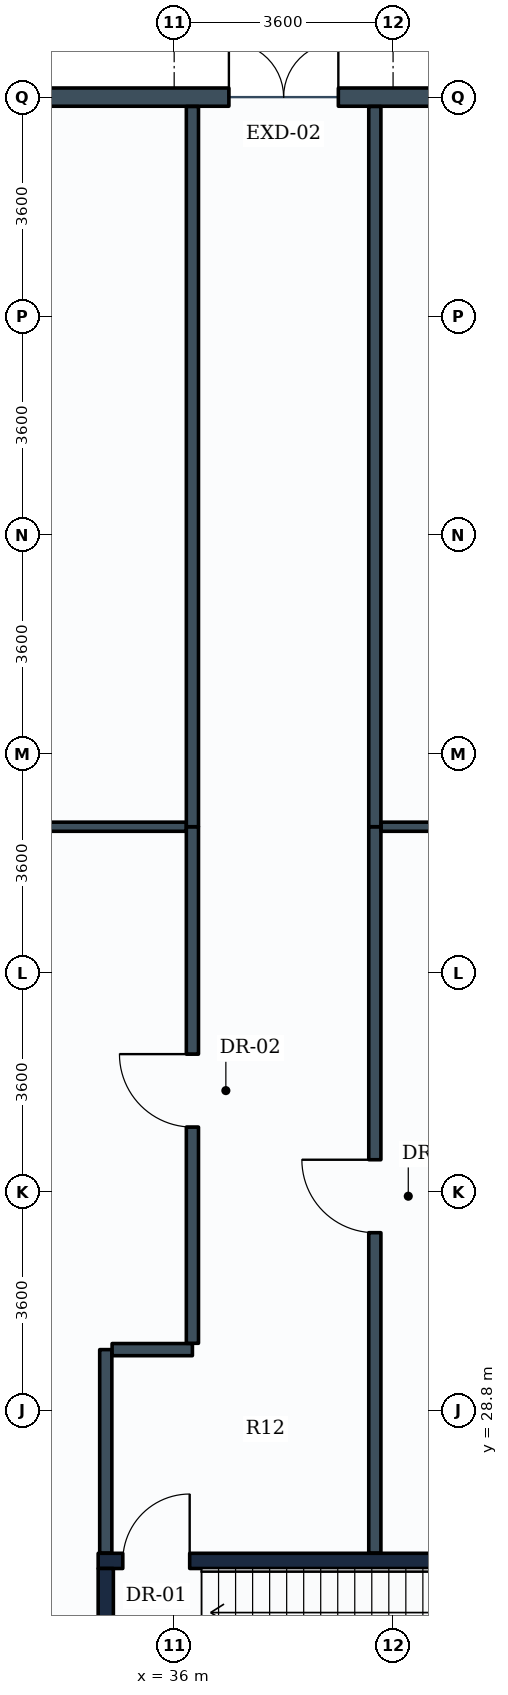
"""IFC4 building model, lengths in metres.
Left out: names, types, materials, properties, quantities, classifications, styles, units other than length and angle.
Written with IfcOpenShell. Run it as: python <this file> out.ifc"""

import sys

from ifc_helpers import new_model, si_unit, direction, frame, frame_2d, origin, place, context, subcontext, project, spatial, rectangle, extrude, element, fill, save


model = new_model("IFC4")
c1 = context("Model", 3, precision=1e-05, world=origin(), true_north=direction((0.0, 1.0)))
c2 = subcontext(c1, "Body", "Model", "MODEL_VIEW")
j1 = project(units=[si_unit("LENGTHUNIT", "METRE"), si_unit("PLANEANGLEUNIT", "RADIAN")], contexts=[c1])
p1 = place(None, origin())
s1 = spatial("IfcSite", under=j1, at=p1, CompositionType="ELEMENT")
p2 = place(p1, origin())
s2 = spatial("IfcBuilding", under=s1, at=p2, CompositionType="ELEMENT")
p3 = place(p2, origin())
s3 = spatial("IfcBuildingStorey", under=s2, at=p3, CompositionType="ELEMENT", Elevation=0.0)
p4 = place(p3, frame((0.0, 50.4, 0.0), z_axis=(0.0, 0.0, 1.0), x_axis=(1.0, 0.0, 0.0)))
e1 = element("IfcWall", 1, at=p4, inside=s3, PredefinedType="STANDARD", context=c2, shape_type="SweptSolid", body=[
    extrude(rectangle(XDim=72.0, YDim=0.3, at=frame_2d((36.0, 0.0))), origin(), (0.0, 0.0, 1.0), 4.43),
])
p5 = place(p4, frame((25.2, 0.0, 0.0)))
e2 = element("IfcOpeningElement", 2, at=p5, cuts=e1, PredefinedType="OPENING", context=c2, shape_type="SweptSolid", body=[
    extrude(rectangle(XDim=1.8, YDim=2.2, at=frame_2d((0.9, 1.1))), frame((0.0, 0.16, 0.0), z_axis=(0.0, -1.0, 0.0), x_axis=(1.0, 0.0, 0.0)), (0.0, 0.0, 1.0), 0.32),
])
p6 = place(p4, frame((36.9, 0.0, 0.0)))
e3 = element("IfcOpeningElement", 3, at=p6, cuts=e1, PredefinedType="OPENING", context=c2, shape_type="SweptSolid", body=[
    extrude(rectangle(XDim=1.8, YDim=2.2, at=frame_2d((0.9, 1.1))), frame((0.0, 0.16, 0.0), z_axis=(0.0, -1.0, 0.0), x_axis=(1.0, 0.0, 0.0)), (0.0, 0.0, 1.0), 0.32),
])
p7 = place(p4, frame((58.5, 0.0, 0.0)))
e4 = element("IfcOpeningElement", 4, at=p7, cuts=e1, PredefinedType="OPENING", context=c2, shape_type="SweptSolid", body=[
    extrude(rectangle(XDim=1.8, YDim=2.2, at=frame_2d((0.9, 1.1))), frame((0.0, 0.16, 0.0), z_axis=(0.0, -1.0, 0.0), x_axis=(1.0, 0.0, 0.0)), (0.0, 0.0, 1.0), 0.32),
])
p8 = place(p4, frame((65.8, 0.0, 0.0)))
e5 = element("IfcOpeningElement", 5, at=p8, cuts=e1, PredefinedType="OPENING", context=c2, shape_type="SweptSolid", body=[
    extrude(rectangle(XDim=5.0, YDim=3.4, at=frame_2d((2.5, 1.7))), frame((0.0, 0.16, 0.0), z_axis=(0.0, -1.0, 0.0), x_axis=(1.0, 0.0, 0.0)), (0.0, 0.0, 1.0), 0.32),
])
p9 = place(p3, frame((34.75, 26.325, 0.0), z_axis=(0.0, 0.0, 1.0), x_axis=(1.0, 0.0, 0.0)))
e6 = element("IfcWall", 6, at=p9, inside=s3, PredefinedType="SHEAR", context=c2, shape_type="SweptSolid", body=[
    extrude(rectangle(XDim=7.8, YDim=0.25, at=frame_2d((3.9, 0.0))), origin(), (0.0, 0.0, 1.0), 5.1),
])
p10 = place(p9, frame((0.405, 0.0, 0.0)))
e7 = element("IfcOpeningElement", 7, at=p10, cuts=e6, PredefinedType="OPENING", context=c2, shape_type="SweptSolid", body=[
    extrude(rectangle(XDim=1.1, YDim=2.1, at=frame_2d((0.55, 1.05))), frame((0.0, 0.135, 0.0), z_axis=(0.0, -1.0, 0.0), x_axis=(1.0, 0.0, 0.0)), (0.0, 0.0, 1.0), 0.27),
])
p11 = place(p3, frame((34.875, 23.1, 0.0), z_axis=(0.0, 0.0, 1.0), x_axis=(0.0, 1.0, 0.0)))
e8 = element("IfcWall", 8, at=p11, inside=s3, PredefinedType="SHEAR", context=c2, shape_type="SweptSolid", body=[
    extrude(rectangle(XDim=3.1, YDim=0.25, at=frame_2d((1.55, 0.0))), origin(), (0.0, 0.0, 1.0), 5.1),
])
p12 = place(p3, frame((34.875, 26.454, 0.0), z_axis=(0.0, 0.0, 1.0), x_axis=(0.0, 1.0, 0.0)))
e9 = element("IfcWall", 9, at=p12, inside=s3, PredefinedType="PARTITIONING", context=c2, shape_type="SweptSolid", body=[
    extrude(rectangle(XDim=3.346, YDim=0.2, at=frame_2d((1.673, 0.0))), origin(), (0.0, 0.0, 1.0), 5.085),
])
p13 = place(p3, frame((34.979, 29.8, 0.0), z_axis=(0.0, 0.0, 1.0), x_axis=(1.0, 0.0, 0.0)))
e10 = element("IfcWall", 10, at=p13, inside=s3, PredefinedType="PARTITIONING", context=c2, shape_type="SweptSolid", body=[
    extrude(rectangle(XDim=1.321, YDim=0.2, at=frame_2d((0.661, 0.0))), origin(), (0.0, 0.0, 1.0), 5.085),
])
p14 = place(p3, frame((36.3, 29.904, 0.0), z_axis=(0.0, 0.0, 1.0), x_axis=(0.0, 1.0, 0.0)))
e11 = element("IfcWall", 11, at=p14, inside=s3, PredefinedType="PARTITIONING", context=c2, shape_type="SweptSolid", body=[
    extrude(rectangle(XDim=8.496, YDim=0.2, at=frame_2d((4.248, 0.0))), origin(), (0.0, 0.0, 1.0), 4.43),
])
p15 = place(p14, frame((3.556, 0.0, 0.0)))
e12 = element("IfcOpeningElement", 12, at=p15, cuts=e11, PredefinedType="OPENING", context=c2, shape_type="SweptSolid", body=[
    extrude(rectangle(XDim=1.2, YDim=2.1, at=frame_2d((0.6, 1.05))), frame((0.0, 0.11, 0.0), z_axis=(0.0, -1.0, 0.0), x_axis=(1.0, 0.0, 0.0)), (0.0, 0.0, 1.0), 0.22),
])
p16 = place(p3, frame((36.3, 38.4, 0.0), z_axis=(0.0, 0.0, 1.0), x_axis=(0.0, 1.0, 0.0)))
e13 = element("IfcWall", 13, at=p16, inside=s3, PredefinedType="PARTITIONING", context=c2, shape_type="SweptSolid", body=[
    extrude(rectangle(XDim=11.846, YDim=0.2, at=frame_2d((5.923, 0.0))), origin(), (0.0, 0.0, 1.0), 4.43),
])
p17 = place(p3, frame((39.3, 26.454, 0.0), z_axis=(0.0, 0.0, 1.0), x_axis=(0.0, 1.0, 0.0)))
e14 = element("IfcWall", 14, at=p17, inside=s3, PredefinedType="PARTITIONING", context=c2, shape_type="SweptSolid", body=[
    extrude(rectangle(XDim=11.946, YDim=0.2, at=frame_2d((5.973, 0.0))), origin(), (0.0, 0.0, 1.0), 4.43),
])
p18 = place(p17, frame((5.269, 0.0, 0.0)))
e15 = element("IfcOpeningElement", 15, at=p18, cuts=e14, PredefinedType="OPENING", context=c2, shape_type="SweptSolid", body=[
    extrude(rectangle(XDim=1.2, YDim=2.1, at=frame_2d((0.6, 1.05))), frame((0.0, 0.11, 0.0), z_axis=(0.0, -1.0, 0.0), x_axis=(1.0, 0.0, 0.0)), (0.0, 0.0, 1.0), 0.22),
])
p19 = place(p3, frame((39.3, 38.4, 0.0), z_axis=(0.0, 0.0, 1.0), x_axis=(0.0, 1.0, 0.0)))
e16 = element("IfcWall", 16, at=p19, inside=s3, PredefinedType="PARTITIONING", context=c2, shape_type="SweptSolid", body=[
    extrude(rectangle(XDim=11.846, YDim=0.2, at=frame_2d((5.923, 0.0))), origin(), (0.0, 0.0, 1.0), 4.43),
])
p20 = place(p3, frame((18.0, 38.4, 0.0), z_axis=(0.0, 0.0, 1.0), x_axis=(1.0, 0.0, 0.0)))
e17 = element("IfcWall", 17, at=p20, inside=s3, PredefinedType="PARTITIONING", context=c2, shape_type="SweptSolid", body=[
    extrude(rectangle(XDim=18.196, YDim=0.15, at=frame_2d((9.098, 0.0))), origin(), (0.0, 0.0, 1.0), 4.43),
])
p21 = place(p20, frame((8.35, 0.0, 0.0)))
e18 = element("IfcOpeningElement", 18, at=p21, cuts=e17, PredefinedType="OPENING", context=c2, shape_type="SweptSolid", body=[
    extrude(rectangle(XDim=1.6, YDim=2.2, at=frame_2d((0.8, 1.1))), frame((0.0, 0.085, 0.0), z_axis=(0.0, -1.0, 0.0), x_axis=(1.0, 0.0, 0.0)), (0.0, 0.0, 1.0), 0.17),
])
p22 = place(p3, frame((39.404, 38.4, 0.0), z_axis=(0.0, 0.0, 1.0), x_axis=(1.0, 0.0, 0.0)))
e19 = element("IfcWall", 19, at=p22, inside=s3, PredefinedType="PARTITIONING", context=c2, shape_type="SweptSolid", body=[
    extrude(rectangle(XDim=8.596, YDim=0.15, at=frame_2d((4.298, 0.0))), origin(), (0.0, 0.0, 1.0), 4.43),
])
p23 = place(p22, frame((3.446, 0.0, 0.0)))
e20 = element("IfcOpeningElement", 20, at=p23, cuts=e19, PredefinedType="OPENING", context=c2, shape_type="SweptSolid", body=[
    extrude(rectangle(XDim=1.6, YDim=2.2, at=frame_2d((0.8, 1.1))), frame((0.0, 0.085, 0.0), z_axis=(0.0, -1.0, 0.0), x_axis=(1.0, 0.0, 0.0)), (0.0, 0.0, 1.0), 0.17),
])
p24 = place(p6, origin())
e21 = element("IfcDoor", 21, at=p24, inside=s3, OperationType="SINGLE_SWING_LEFT", PredefinedType="DOOR", context=c2, shape_type="SweptSolid", body=[
    extrude(rectangle(XDim=1.8, YDim=2.2, at=frame_2d((0.9, 1.1))), frame((0.0, 0.025, 0.0), z_axis=(0.0, -1.0, 0.0), x_axis=(1.0, 0.0, 0.0)), (0.0, 0.0, 1.0), 0.05),
])
fill(e3, e21)
p25 = place(p10, origin())
e22 = element("IfcDoor", 22, at=p25, inside=s3, OperationType="SINGLE_SWING_RIGHT", PredefinedType="DOOR", context=c2, shape_type="SweptSolid", body=[
    extrude(rectangle(XDim=1.1, YDim=2.1, at=frame_2d((0.55, 1.05))), frame((0.0, 0.025, 0.0), z_axis=(0.0, -1.0, 0.0), x_axis=(1.0, 0.0, 0.0)), (0.0, 0.0, 1.0), 0.05),
])
fill(e7, e22)
p26 = place(p15, origin())
e23 = element("IfcDoor", 23, at=p26, inside=s3, OperationType="SINGLE_SWING_RIGHT", PredefinedType="DOOR", context=c2, shape_type="SweptSolid", body=[
    extrude(rectangle(XDim=1.2, YDim=2.1, at=frame_2d((0.6, 1.05))), frame((0.0, 0.025, 0.0), z_axis=(0.0, -1.0, 0.0), x_axis=(1.0, 0.0, 0.0)), (0.0, 0.0, 1.0), 0.05),
])
fill(e12, e23)
p27 = place(p18, origin())
e24 = element("IfcDoor", 24, at=p27, inside=s3, OperationType="SINGLE_SWING_RIGHT", PredefinedType="DOOR", context=c2, shape_type="SweptSolid", body=[
    extrude(rectangle(XDim=1.2, YDim=2.1, at=frame_2d((0.6, 1.05))), frame((0.0, 0.025, 0.0), z_axis=(0.0, -1.0, 0.0), x_axis=(1.0, 0.0, 0.0)), (0.0, 0.0, 1.0), 0.05),
])
fill(e15, e24)
save(model, sys.argv[1])
